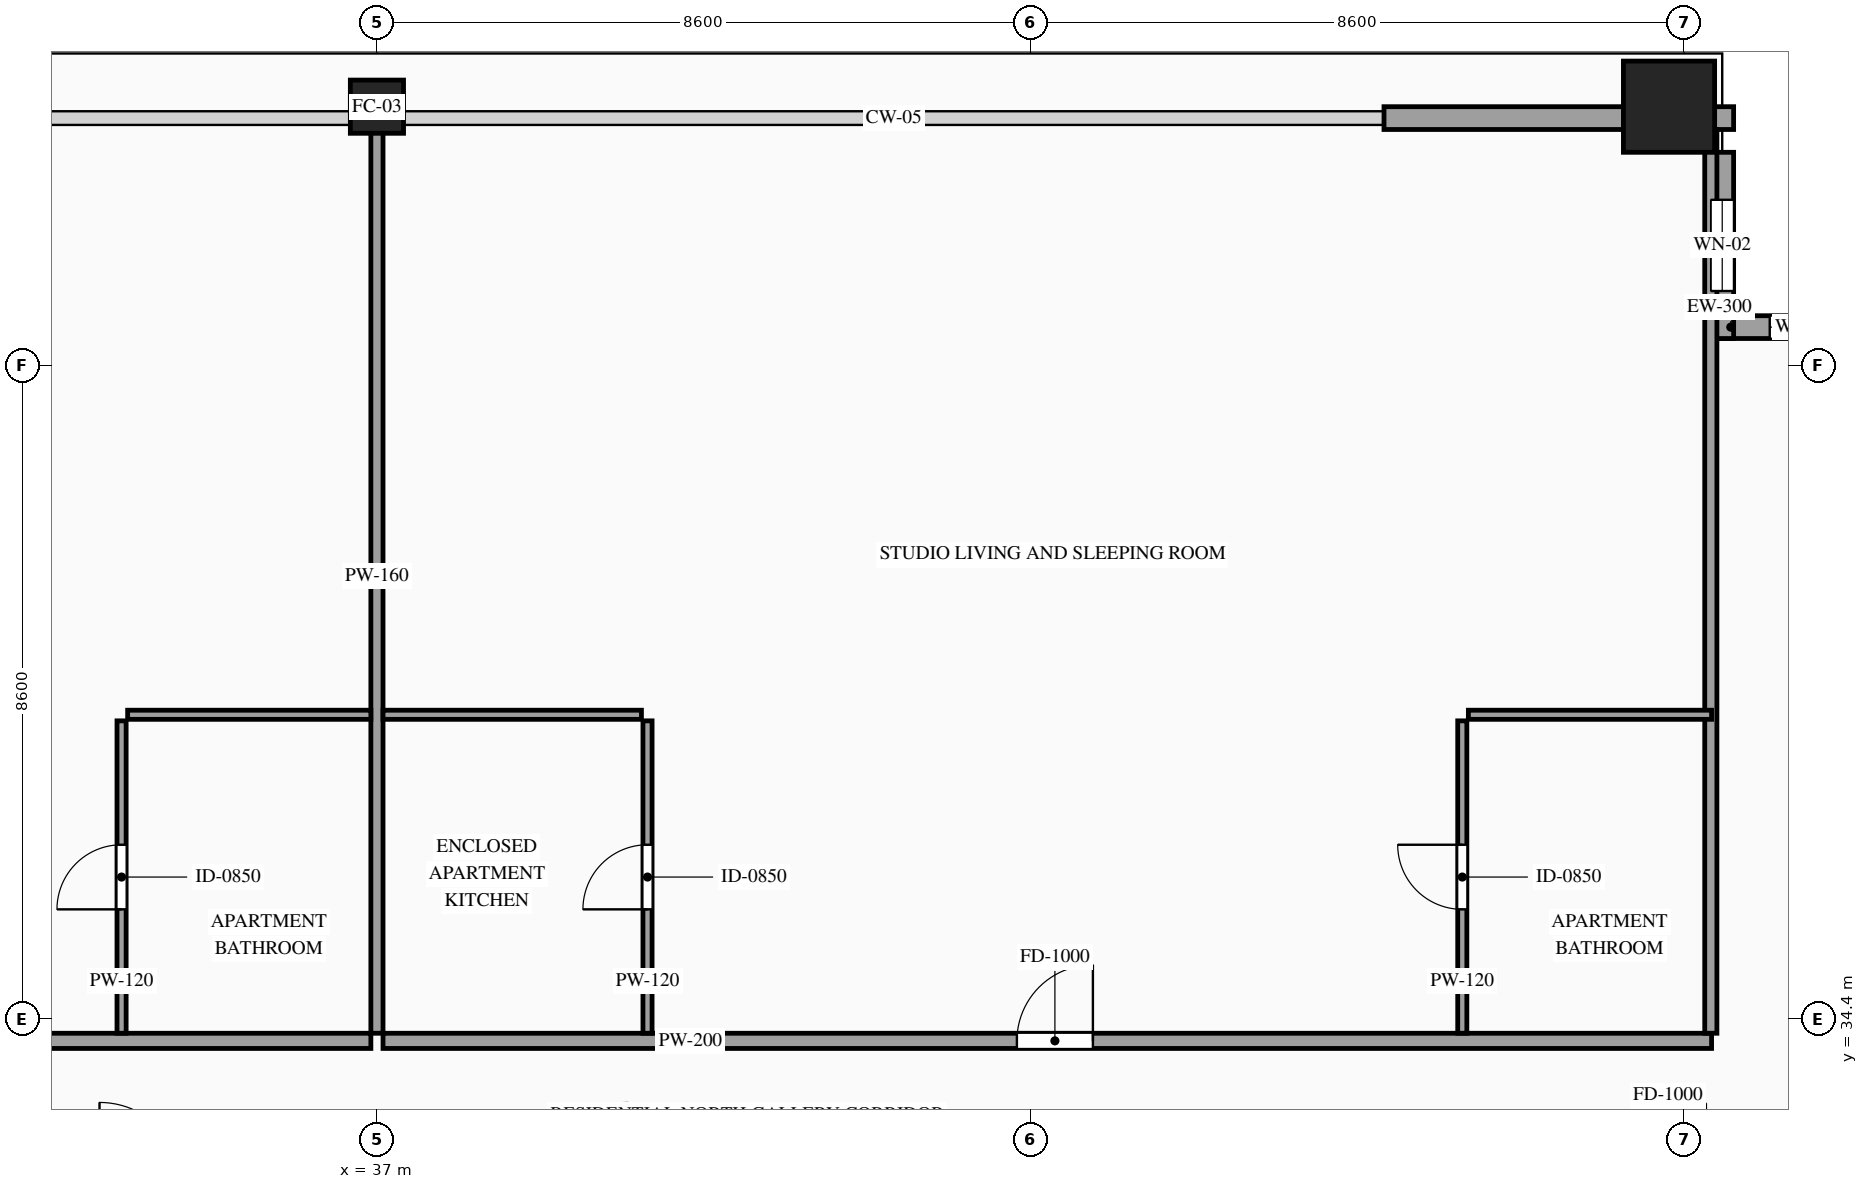
"""IFC4 building model, lengths in metres.
Left out: names, types, materials, properties, quantities, classifications, styles, units other than length and angle.
Written with IfcOpenShell. Run it as: python <this file> out.ifc"""

import sys

from ifc_helpers import new_model, si_unit, direction, frame, frame_2d, origin, origin_2d, place, context, subcontext, project, spatial, rectangle, hollow_rectangle, extrude, source, transform, mapped, element, fill, save


model = new_model("IFC4")
c1 = context("Model", 3, precision=1e-05, world=origin(), true_north=direction((0.0, 1.0)))
c2 = subcontext(c1, "Body", "Model", "MODEL_VIEW")
j1 = project(units=[si_unit("LENGTHUNIT", "METRE"), si_unit("PLANEANGLEUNIT", "RADIAN")], contexts=[c1])
p1 = place(None, origin())
s1 = spatial("IfcSite", under=j1, at=p1, CompositionType="ELEMENT")
p2 = place(p1, origin())
s2 = spatial("IfcBuilding", under=s1, at=p2, CompositionType="ELEMENT")
p3 = place(p2, frame((0.0, 0.0, 227.6)))
s3 = spatial("IfcBuildingStorey", under=s2, at=p3, CompositionType="ELEMENT", Elevation=227.6)
m1 = source(origin(), c2, "Body", "SweptSolid", [
    extrude(hollow_rectangle(XDim=0.7, YDim=0.7, WallThickness=0.032, at=origin_2d()), origin(), (0.0, 0.0, 1.0), 3.5),
])
p4 = place(p3, frame((37.0, 46.4, 0.0), z_axis=(0.0, 0.0, 1.0), x_axis=(1.0, 0.0, 0.0)))
e1 = element("IfcColumn", 1, at=p4, inside=s3, PredefinedType="COLUMN", context=c2, shape_type="MappedRepresentation", body=[
    mapped(m1, transform((0.0, 0.0, 0.0), scale=1.0)),
])
m2 = source(origin(), c2, "Body", "SweptSolid", [
    extrude(hollow_rectangle(XDim=1.2, YDim=1.2, WallThickness=0.055, at=origin_2d()), origin(), (0.0, 0.0, 1.0), 3.5),
])
p5 = place(p3, frame((54.0, 46.4, 0.0), z_axis=(0.0, 0.0, 1.0), x_axis=(1.0, 0.0, 0.0)))
e2 = element("IfcColumn", 2, at=p5, inside=s3, PredefinedType="COLUMN", context=c2, shape_type="MappedRepresentation", body=[
    mapped(m2, transform((0.0, 0.0, 0.0), scale=1.0)),
])
p6 = place(p3, frame((57.0, 43.5, 0.0), z_axis=(0.0, 0.0, 1.0), x_axis=(-1.0, 0.0, 0.0)))
e3 = element("IfcWall", 3, at=p6, inside=s3, PredefinedType="SOLIDWALL", context=c2, shape_type="SweptSolid", body=[
    extrude(rectangle(XDim=2.45, YDim=0.3, at=frame_2d((1.225, 0.0))), origin(), (0.0, 0.0, 1.0), 3.28),
])
p7 = place(p6, frame((0.775, 0.0, 0.85)))
e4 = element("IfcOpeningElement", 4, at=p7, cuts=e3, PredefinedType="OPENING", context=c2, shape_type="SweptSolid", body=[
    extrude(rectangle(XDim=0.9, YDim=1.5, at=frame_2d((0.45, 0.75))), frame((0.0, 0.165, 0.0), z_axis=(0.0, -1.0, 0.0), x_axis=(1.0, 0.0, 0.0)), (0.0, 0.0, 1.0), 0.33),
])
p8 = place(p3, frame((54.7, 43.35, 0.0), z_axis=(0.0, 0.0, 1.0), x_axis=(0.0, 1.0, 0.0)))
e5 = element("IfcWall", 5, at=p8, inside=s3, PredefinedType="SOLIDWALL", context=c2, shape_type="SweptSolid", body=[
    extrude(rectangle(XDim=2.45, YDim=0.3, at=frame_2d((1.225, 0.0))), origin(), (0.0, 0.0, 1.0), 3.28),
])
p9 = place(p8, frame((0.625, 0.0, 0.85)))
e6 = element("IfcOpeningElement", 6, at=p9, cuts=e5, PredefinedType="OPENING", context=c2, shape_type="SweptSolid", body=[
    extrude(rectangle(XDim=1.2, YDim=2.1, at=frame_2d((0.6, 1.05))), frame((0.0, 0.165, 0.0), z_axis=(0.0, -1.0, 0.0), x_axis=(1.0, 0.0, 0.0)), (0.0, 0.0, 1.0), 0.33),
])
m3 = source(origin(), c2, "Body", "SweptSolid", [
    extrude(rectangle(XDim=0.25, YDim=0.3, at=frame_2d((0.125, 0.0))), origin(), (0.0, 0.0, 1.0), 3.28),
])
p10 = place(p3, frame((54.6, 46.25, 0.0), z_axis=(0.0, 0.0, 1.0), x_axis=(1.0, 0.0, 0.0)))
e7 = element("IfcWall", 7, at=p10, inside=s3, PredefinedType="SOLIDWALL", context=c2, shape_type="MappedRepresentation", body=[
    mapped(m3, transform((0.0, 0.0, 0.0), scale=1.0)),
])
m4 = source(origin(), c2, "Body", "SweptSolid", [
    extrude(rectangle(XDim=3.15, YDim=0.3, at=frame_2d((1.575, 0.0))), origin(), (0.0, 0.0, 1.0), 2.835),
])
p11 = place(p3, frame((50.25, 46.25, 0.0), z_axis=(0.0, 0.0, 1.0), x_axis=(1.0, 0.0, 0.0)))
e8 = element("IfcWall", 8, at=p11, inside=s3, PredefinedType="SOLIDWALL", context=c2, shape_type="MappedRepresentation", body=[
    mapped(m4, transform((0.0, 0.0, 0.0), scale=1.0)),
])
p12 = place(p3, frame((19.44, 34.11, 0.0), z_axis=(0.0, 0.0, 1.0), x_axis=(1.0, 0.0, 0.0)))
e9 = element("IfcWall", 9, at=p12, inside=s3, PredefinedType="PARTITIONING", context=c2, shape_type="SweptSolid", body=[
    extrude(rectangle(XDim=17.48, YDim=0.2, at=frame_2d((8.74, 0.0))), origin(), (0.0, 0.0, 1.0), 3.28),
])
p13 = place(p12, frame((8.34, 0.0, 0.0)))
e10 = element("IfcOpeningElement", 10, at=p13, cuts=e9, PredefinedType="OPENING", context=c2, shape_type="SweptSolid", body=[
    extrude(rectangle(XDim=1.0, YDim=2.2, at=frame_2d((0.5, 1.1))), frame((0.0, 0.115, 0.0), z_axis=(0.0, -1.0, 0.0), x_axis=(1.0, 0.0, 0.0)), (0.0, 0.0, 1.0), 0.23),
])
m5 = source(origin(), c2, "Body", "SweptSolid", [
    extrude(rectangle(XDim=12.04, YDim=0.16, at=frame_2d((6.02, 0.0))), origin(), (0.0, 0.0, 1.0), 2.787),
])
p14 = place(p3, frame((37.0, 34.21, 0.0), z_axis=(0.0, 0.0, 1.0), x_axis=(0.0, 1.0, 0.0)))
e11 = element("IfcWall", 11, at=p14, inside=s3, PredefinedType="PARTITIONING", context=c2, shape_type="MappedRepresentation", body=[
    mapped(m5, transform((0.0, 0.0, 0.0), scale=1.0)),
])
m6 = source(origin(), c2, "Body", "SweptSolid", [
    extrude(rectangle(XDim=3.2, YDim=0.12, at=frame_2d((1.6, 0.0))), origin(), (0.0, 0.0, 1.0), 3.28),
])
p15 = place(p3, frame((33.72, 38.4, 0.0), z_axis=(0.0, 0.0, 1.0), x_axis=(1.0, 0.0, 0.0)))
e12 = element("IfcWall", 12, at=p15, inside=s3, PredefinedType="PARTITIONING", context=c2, shape_type="MappedRepresentation", body=[
    mapped(m6, transform((0.0, 0.0, 0.0), scale=1.0)),
])
p16 = place(p3, frame((33.64, 34.21, 0.0), z_axis=(0.0, 0.0, 1.0), x_axis=(0.0, 1.0, 0.0)))
e13 = element("IfcWall", 13, at=p16, inside=s3, PredefinedType="PARTITIONING", context=c2, shape_type="SweptSolid", body=[
    extrude(rectangle(XDim=4.11, YDim=0.12, at=frame_2d((2.055, 0.0))), origin(), (0.0, 0.0, 1.0), 3.28),
])
p17 = place(p16, frame((1.63, 0.0, 0.0)))
e14 = element("IfcOpeningElement", 14, at=p17, cuts=e13, PredefinedType="OPENING", context=c2, shape_type="SweptSolid", body=[
    extrude(rectangle(XDim=0.85, YDim=2.1, at=frame_2d((0.425, 1.05))), frame((0.0, 0.075, 0.0), z_axis=(0.0, -1.0, 0.0), x_axis=(1.0, 0.0, 0.0)), (0.0, 0.0, 1.0), 0.15),
])
p18 = place(p3, frame((37.08, 34.11, 0.0), z_axis=(0.0, 0.0, 1.0), x_axis=(1.0, 0.0, 0.0)))
e15 = element("IfcWall", 15, at=p18, inside=s3, PredefinedType="PARTITIONING", context=c2, shape_type="SweptSolid", body=[
    extrude(rectangle(XDim=17.48, YDim=0.2, at=frame_2d((8.74, 0.0))), origin(), (0.0, 0.0, 1.0), 3.28),
])
p19 = place(p18, frame((8.34, 0.0, 0.0)))
e16 = element("IfcOpeningElement", 16, at=p19, cuts=e15, PredefinedType="OPENING", context=c2, shape_type="SweptSolid", body=[
    extrude(rectangle(XDim=1.0, YDim=2.2, at=frame_2d((0.5, 1.1))), frame((0.0, 0.115, 0.0), z_axis=(0.0, -1.0, 0.0), x_axis=(1.0, 0.0, 0.0)), (0.0, 0.0, 1.0), 0.23),
])
m7 = source(origin(), c2, "Body", "SweptSolid", [
    extrude(rectangle(XDim=11.89, YDim=0.16, at=frame_2d((5.945, 0.0))), origin(), (0.0, 0.0, 1.0), 3.28),
])
p20 = place(p3, frame((54.55, 34.21, 0.0), z_axis=(0.0, 0.0, 1.0), x_axis=(0.0, 1.0, 0.0)))
e17 = element("IfcWall", 17, at=p20, inside=s3, PredefinedType="PARTITIONING", context=c2, shape_type="MappedRepresentation", body=[
    mapped(m7, transform((0.0, 0.0, 0.0), scale=1.0)),
])
m8 = source(origin(), c2, "Body", "SweptSolid", [
    extrude(rectangle(XDim=3.4, YDim=0.12, at=frame_2d((1.7, 0.0))), origin(), (0.0, 0.0, 1.0), 3.28),
])
p21 = place(p3, frame((37.08, 38.4, 0.0), z_axis=(0.0, 0.0, 1.0), x_axis=(1.0, 0.0, 0.0)))
e18 = element("IfcWall", 18, at=p21, inside=s3, PredefinedType="PARTITIONING", context=c2, shape_type="MappedRepresentation", body=[
    mapped(m8, transform((0.0, 0.0, 0.0), scale=1.0)),
])
p22 = place(p3, frame((40.56, 34.21, 0.0), z_axis=(0.0, 0.0, 1.0), x_axis=(0.0, 1.0, 0.0)))
e19 = element("IfcWall", 19, at=p22, inside=s3, PredefinedType="PARTITIONING", context=c2, shape_type="SweptSolid", body=[
    extrude(rectangle(XDim=4.11, YDim=0.12, at=frame_2d((2.055, 0.0))), origin(), (0.0, 0.0, 1.0), 3.28),
])
p23 = place(p22, frame((1.63, 0.0, 0.0)))
e20 = element("IfcOpeningElement", 20, at=p23, cuts=e19, PredefinedType="OPENING", context=c2, shape_type="SweptSolid", body=[
    extrude(rectangle(XDim=0.85, YDim=2.1, at=frame_2d((0.425, 1.05))), frame((0.0, 0.075, 0.0), z_axis=(0.0, -1.0, 0.0), x_axis=(1.0, 0.0, 0.0)), (0.0, 0.0, 1.0), 0.15),
])
p24 = place(p3, frame((51.36, 38.4, 0.0), z_axis=(0.0, 0.0, 1.0), x_axis=(1.0, 0.0, 0.0)))
e21 = element("IfcWall", 21, at=p24, inside=s3, PredefinedType="PARTITIONING", context=c2, shape_type="MappedRepresentation", body=[
    mapped(m6, transform((0.0, 0.0, 0.0), scale=1.0)),
])
p25 = place(p3, frame((51.28, 34.21, 0.0), z_axis=(0.0, 0.0, 1.0), x_axis=(0.0, 1.0, 0.0)))
e22 = element("IfcWall", 22, at=p25, inside=s3, PredefinedType="PARTITIONING", context=c2, shape_type="SweptSolid", body=[
    extrude(rectangle(XDim=4.11, YDim=0.12, at=frame_2d((2.055, 0.0))), origin(), (0.0, 0.0, 1.0), 3.28),
])
p26 = place(p25, frame((1.63, 0.0, 0.0)))
e23 = element("IfcOpeningElement", 23, at=p26, cuts=e22, PredefinedType="OPENING", context=c2, shape_type="SweptSolid", body=[
    extrude(rectangle(XDim=0.85, YDim=2.1, at=frame_2d((0.425, 1.05))), frame((0.0, 0.075, 0.0), z_axis=(0.0, -1.0, 0.0), x_axis=(1.0, 0.0, 0.0)), (0.0, 0.0, 1.0), 0.15),
])
m9 = source(origin(), c2, "Body", "SweptSolid", [
    extrude(rectangle(XDim=0.9, YDim=1.5, at=frame_2d((0.45, 0.75))), frame((0.0, 0.03, 0.0), z_axis=(0.0, -1.0, 0.0), x_axis=(1.0, 0.0, 0.0)), (0.0, 0.0, 1.0), 0.06),
])
p27 = place(p7, origin())
e24 = element("IfcWindow", 24, at=p27, inside=s3, PartitioningType="SINGLE_PANEL", PredefinedType="WINDOW", context=c2, shape_type="MappedRepresentation", body=[
    mapped(m9, transform((0.0, 0.0, 0.0), scale=1.0)),
])
fill(e4, e24)
m10 = source(origin(), c2, "Body", "SweptSolid", [
    extrude(rectangle(XDim=1.2, YDim=2.1, at=frame_2d((0.6, 1.05))), frame((0.0, 0.03, 0.0), z_axis=(0.0, -1.0, 0.0), x_axis=(1.0, 0.0, 0.0)), (0.0, 0.0, 1.0), 0.06),
])
p28 = place(p9, origin())
e25 = element("IfcWindow", 25, at=p28, inside=s3, PartitioningType="SINGLE_PANEL", PredefinedType="WINDOW", context=c2, shape_type="MappedRepresentation", body=[
    mapped(m10, transform((0.0, 0.0, 0.0), scale=1.0)),
])
fill(e6, e25)
m11 = source(origin(), c2, "Body", "SweptSolid", [
    extrude(rectangle(XDim=0.85, YDim=2.1, at=frame_2d((0.425, 1.05))), frame((0.0, 0.025, 0.0), z_axis=(0.0, -1.0, 0.0), x_axis=(1.0, 0.0, 0.0)), (0.0, 0.0, 1.0), 0.05),
])
p29 = place(p17, origin())
e26 = element("IfcDoor", 26, at=p29, inside=s3, OperationType="SINGLE_SWING_LEFT", PredefinedType="DOOR", context=c2, shape_type="MappedRepresentation", body=[
    mapped(m11, transform((0.0, 0.0, 0.0), scale=1.0)),
])
fill(e14, e26)
m12 = source(origin(), c2, "Body", "SweptSolid", [
    extrude(rectangle(XDim=1.0, YDim=2.2, at=frame_2d((0.5, 1.1))), frame((0.0, 0.025, 0.0), z_axis=(0.0, -1.0, 0.0), x_axis=(1.0, 0.0, 0.0)), (0.0, 0.0, 1.0), 0.05),
])
p30 = place(p19, origin())
e27 = element("IfcDoor", 27, at=p30, inside=s3, OperationType="SINGLE_SWING_RIGHT", PredefinedType="DOOR", context=c2, shape_type="MappedRepresentation", body=[
    mapped(m12, transform((0.0, 0.0, 0.0), scale=1.0)),
])
fill(e16, e27)
p31 = place(p23, origin())
e28 = element("IfcDoor", 28, at=p31, inside=s3, OperationType="SINGLE_SWING_LEFT", PredefinedType="DOOR", context=c2, shape_type="MappedRepresentation", body=[
    mapped(m11, transform((0.0, 0.0, 0.0), scale=1.0)),
])
fill(e20, e28)
p32 = place(p26, origin())
e29 = element("IfcDoor", 29, at=p32, inside=s3, OperationType="SINGLE_SWING_RIGHT", PredefinedType="DOOR", context=c2, shape_type="MappedRepresentation", body=[
    mapped(m11, transform((0.0, 0.0, 0.0), scale=1.0)),
])
fill(e23, e29)
save(model, sys.argv[1])
